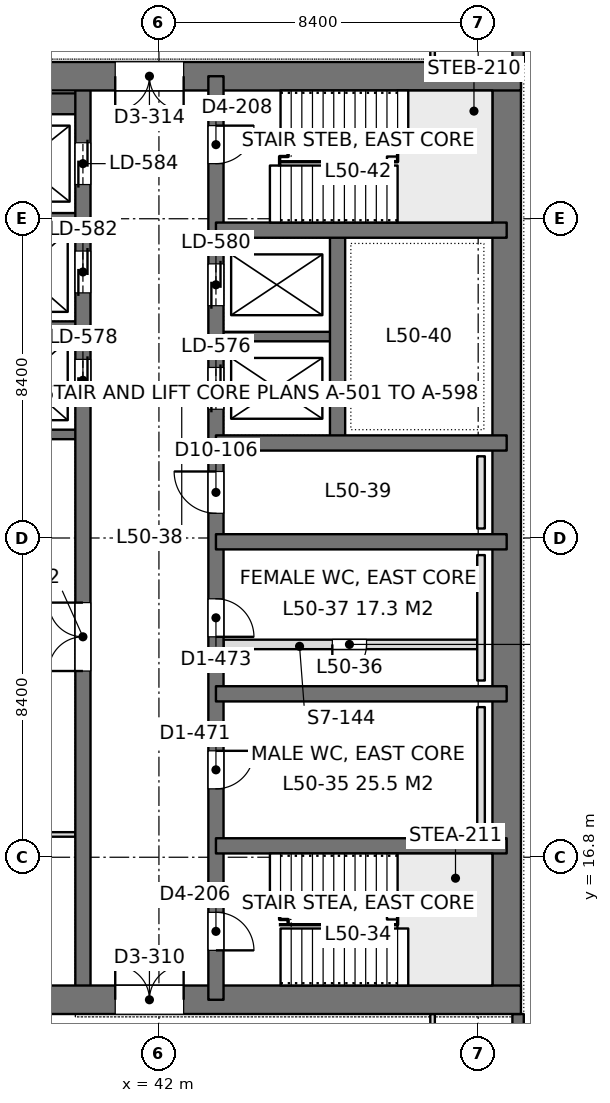
"""IFC4 building model, lengths in metres.
Left out: names, types, materials, properties, quantities, classifications, styles, units other than length and angle.
Written with IfcOpenShell. Run it as: python <this file> out.ifc"""

import sys

from ifc_helpers import new_model, si_unit, direction, frame, frame_2d, origin, place, context, subcontext, project, spatial, rectangle, extrude, element, fill, save


model = new_model("IFC4")
c1 = context("Model", 3, precision=1e-05, world=origin(), true_north=direction((0.0, 1.0)))
c2 = subcontext(c1, "Body", "Model", "MODEL_VIEW")
j1 = project(units=[si_unit("LENGTHUNIT", "METRE"), si_unit("PLANEANGLEUNIT", "RADIAN")], contexts=[c1])
p1 = place(None, origin())
s1 = spatial("IfcSite", under=j1, at=p1, CompositionType="ELEMENT")
p2 = place(p1, origin())
s2 = spatial("IfcBuilding", under=s1, at=p2, CompositionType="ELEMENT")
p3 = place(p2, frame((0.0, 0.0, 219.6)))
s3 = spatial("IfcBuildingStorey", under=s2, at=p3, CompositionType="ELEMENT", Elevation=219.6)
p4 = place(p3, frame((33.675, 13.05, 0.0), z_axis=(0.0, 0.0, 1.0), x_axis=(1.0, 0.0, 0.0)))
e1 = element("IfcWall", 1, at=p4, inside=s3, PredefinedType="SHEAR", context=c2, shape_type="SweptSolid", body=[
    extrude(rectangle(XDim=17.85, YDim=0.75, at=frame_2d((8.925, 0.0))), origin(), (0.0, 0.0, 1.0), 4.2),
])
p5 = place(p4, frame((7.175, 0.0, 0.0)))
e2 = element("IfcOpeningElement", 2, at=p5, cuts=e1, PredefinedType="OPENING", context=c2, shape_type="SweptSolid", body=[
    extrude(rectangle(XDim=1.8, YDim=2.4, at=frame_2d((0.9, 1.2))), frame((0.0, 0.385, 0.0), z_axis=(0.0, -1.0, 0.0), x_axis=(1.0, 0.0, 0.0)), (0.0, 0.0, 1.0), 0.77),
])
p6 = place(p3, frame((33.675, 37.35, 0.0), z_axis=(0.0, 0.0, 1.0), x_axis=(1.0, 0.0, 0.0)))
e3 = element("IfcWall", 3, at=p6, inside=s3, PredefinedType="SHEAR", context=c2, shape_type="SweptSolid", body=[
    extrude(rectangle(XDim=17.85, YDim=0.75, at=frame_2d((8.925, 0.0))), origin(), (0.0, 0.0, 1.0), 4.2),
])
p7 = place(p6, frame((7.175, 0.0, 0.0)))
e4 = element("IfcOpeningElement", 4, at=p7, cuts=e3, PredefinedType="OPENING", context=c2, shape_type="SweptSolid", body=[
    extrude(rectangle(XDim=1.8, YDim=2.4, at=frame_2d((0.9, 1.2))), frame((0.0, 0.385, 0.0), z_axis=(0.0, -1.0, 0.0), x_axis=(1.0, 0.0, 0.0)), (0.0, 0.0, 1.0), 0.77),
])
p8 = place(p3, frame((51.15, 13.05, 0.0), z_axis=(0.0, 0.0, 1.0), x_axis=(0.0, 1.0, 0.0)))
e5 = element("IfcWall", 5, at=p8, inside=s3, PredefinedType="SHEAR", context=c2, shape_type="SweptSolid", body=[
    extrude(rectangle(XDim=24.3, YDim=0.75, at=frame_2d((12.15, 0.0))), origin(), (0.0, 0.0, 1.0), 4.2),
])
p9 = place(p3, frame((43.5, 13.05, 0.0), z_axis=(0.0, 0.0, 1.0), x_axis=(0.0, 1.0, 0.0)))
e6 = element("IfcWall", 6, at=p9, inside=s3, PredefinedType="SHEAR", context=c2, shape_type="SweptSolid", body=[
    extrude(rectangle(XDim=24.3, YDim=0.4, at=frame_2d((12.15, 0.0))), origin(), (0.0, 0.0, 1.0), 4.2),
])
p10 = place(p9, frame((1.3, 0.0, 0.0)))
e7 = element("IfcOpeningElement", 7, at=p10, cuts=e6, PredefinedType="OPENING", context=c2, shape_type="SweptSolid", body=[
    extrude(rectangle(XDim=1.0, YDim=2.2, at=frame_2d((0.5, 1.1))), frame((0.0, 0.21, 0.0), z_axis=(0.0, -1.0, 0.0), x_axis=(1.0, 0.0, 0.0)), (0.0, 0.0, 1.0), 0.42),
])
p11 = place(p9, frame((22.0, 0.0, 0.0)))
e8 = element("IfcOpeningElement", 8, at=p11, cuts=e6, PredefinedType="OPENING", context=c2, shape_type="SweptSolid", body=[
    extrude(rectangle(XDim=1.0, YDim=2.2, at=frame_2d((0.5, 1.1))), frame((0.0, 0.21, 0.0), z_axis=(0.0, -1.0, 0.0), x_axis=(1.0, 0.0, 0.0)), (0.0, 0.0, 1.0), 0.42),
])
p12 = place(p9, frame((5.55, 0.0, 0.0)))
e9 = element("IfcOpeningElement", 9, at=p12, cuts=e6, PredefinedType="OPENING", context=c2, shape_type="SweptSolid", body=[
    extrude(rectangle(XDim=1.0, YDim=2.2, at=frame_2d((0.5, 1.1))), frame((0.0, 0.21, 0.0), z_axis=(0.0, -1.0, 0.0), x_axis=(1.0, 0.0, 0.0)), (0.0, 0.0, 1.0), 0.42),
])
p13 = place(p9, frame((9.55, 0.0, 0.0)))
e10 = element("IfcOpeningElement", 10, at=p13, cuts=e6, PredefinedType="OPENING", context=c2, shape_type="SweptSolid", body=[
    extrude(rectangle(XDim=1.0, YDim=2.2, at=frame_2d((0.5, 1.1))), frame((0.0, 0.21, 0.0), z_axis=(0.0, -1.0, 0.0), x_axis=(1.0, 0.0, 0.0)), (0.0, 0.0, 1.0), 0.42),
])
p14 = place(p9, frame((12.8, 0.0, 0.0)))
e11 = element("IfcOpeningElement", 11, at=p14, cuts=e6, PredefinedType="OPENING", context=c2, shape_type="SweptSolid", body=[
    extrude(rectangle(XDim=1.1, YDim=2.2, at=frame_2d((0.55, 1.1))), frame((0.0, 0.21, 0.0), z_axis=(0.0, -1.0, 0.0), x_axis=(1.0, 0.0, 0.0)), (0.0, 0.0, 1.0), 0.42),
])
p15 = place(p9, frame((15.538, 0.0, 0.0)))
e12 = element("IfcOpeningElement", 12, at=p15, cuts=e6, PredefinedType="OPENING", context=c2, shape_type="SweptSolid", body=[
    extrude(rectangle(XDim=1.1, YDim=2.2, at=frame_2d((0.55, 1.1))), frame((0.0, 0.21, 0.0), z_axis=(0.0, -1.0, 0.0), x_axis=(1.0, 0.0, 0.0)), (0.0, 0.0, 1.0), 0.42),
])
p16 = place(p9, frame((18.262, 0.0, 0.0)))
e13 = element("IfcOpeningElement", 13, at=p16, cuts=e6, PredefinedType="OPENING", context=c2, shape_type="SweptSolid", body=[
    extrude(rectangle(XDim=1.1, YDim=2.2, at=frame_2d((0.55, 1.1))), frame((0.0, 0.21, 0.0), z_axis=(0.0, -1.0, 0.0), x_axis=(1.0, 0.0, 0.0)), (0.0, 0.0, 1.0), 0.42),
])
p17 = place(p3, frame((40.0, 13.05, 0.0), z_axis=(0.0, 0.0, 1.0), x_axis=(0.0, 1.0, 0.0)))
e14 = element("IfcWall", 14, at=p17, inside=s3, PredefinedType="SHEAR", context=c2, shape_type="SweptSolid", body=[
    extrude(rectangle(XDim=24.3, YDim=0.4, at=frame_2d((12.15, 0.0))), origin(), (0.0, 0.0, 1.0), 4.2),
])
p18 = place(p17, frame((15.75, 0.0, 0.0)))
e15 = element("IfcOpeningElement", 15, at=p18, cuts=e14, PredefinedType="OPENING", context=c2, shape_type="SweptSolid", body=[
    extrude(rectangle(XDim=1.1, YDim=2.2, at=frame_2d((0.55, 1.1))), frame((0.0, 0.21, 0.0), z_axis=(0.0, -1.0, 0.0), x_axis=(1.0, 0.0, 0.0)), (0.0, 0.0, 1.0), 0.42),
])
p19 = place(p17, frame((18.6, 0.0, 0.0)))
e16 = element("IfcOpeningElement", 16, at=p19, cuts=e14, PredefinedType="OPENING", context=c2, shape_type="SweptSolid", body=[
    extrude(rectangle(XDim=1.1, YDim=2.2, at=frame_2d((0.55, 1.1))), frame((0.0, 0.21, 0.0), z_axis=(0.0, -1.0, 0.0), x_axis=(1.0, 0.0, 0.0)), (0.0, 0.0, 1.0), 0.42),
])
p20 = place(p17, frame((21.45, 0.0, 0.0)))
e17 = element("IfcOpeningElement", 17, at=p20, cuts=e14, PredefinedType="OPENING", context=c2, shape_type="SweptSolid", body=[
    extrude(rectangle(XDim=1.1, YDim=2.2, at=frame_2d((0.55, 1.1))), frame((0.0, 0.21, 0.0), z_axis=(0.0, -1.0, 0.0), x_axis=(1.0, 0.0, 0.0)), (0.0, 0.0, 1.0), 0.42),
])
p21 = place(p17, frame((8.65, 0.0, 0.0)))
e18 = element("IfcOpeningElement", 18, at=p21, cuts=e14, PredefinedType="OPENING", context=c2, shape_type="SweptSolid", body=[
    extrude(rectangle(XDim=1.8, YDim=2.4, at=frame_2d((0.9, 1.2))), frame((0.0, 0.21, 0.0), z_axis=(0.0, -1.0, 0.0), x_axis=(1.0, 0.0, 0.0)), (0.0, 0.0, 1.0), 0.42),
])
for number, where, z_axis, x_axis in (
    (19, (51.15, 17.1, 0.0), (0.0, 0.0, 1.0), (-1.0, 0.0, 0.0)),
    (20, (51.15, 21.1, 0.0), (0.0, 0.0, 1.0), (-1.0, 0.0, 0.0)),
    (21, (51.15, 25.1, 0.0), (0.0, 0.0, 1.0), (-1.0, 0.0, 0.0)),
    (22, (51.15, 27.7, 0.0), (0.0, 0.0, 1.0), (-1.0, 0.0, 0.0)),
    (23, (51.15, 33.3, 0.0), (0.0, 0.0, 1.0), (-1.0, 0.0, 0.0)),
):
    element("IfcWall", number, at=place(p3, frame(where, z_axis=z_axis, x_axis=x_axis)), inside=s3, PredefinedType="SHEAR", context=c2, shape_type="SweptSolid", body=[
        extrude(rectangle(XDim=7.65, YDim=0.4, at=frame_2d((3.825, 0.0))), origin(), (0.0, 0.0, 1.0), 4.2),
    ])
p22 = place(p3, frame((46.7, 27.7, 0.0), z_axis=(0.0, 0.0, 1.0), x_axis=(0.0, 1.0, 0.0)))
e24 = element("IfcWall", 24, at=p22, inside=s3, PredefinedType="SHEAR", context=c2, shape_type="SweptSolid", body=[
    extrude(rectangle(XDim=5.6, YDim=0.4, at=frame_2d((2.8, 0.0))), origin(), (0.0, 0.0, 1.0), 4.2),
])
p23 = place(p3, frame((46.7, 30.5, 0.0), z_axis=(0.0, 0.0, 1.0), x_axis=(-1.0, 0.0, 0.0)))
e25 = element("IfcWall", 25, at=p23, inside=s3, PredefinedType="SHEAR", context=c2, shape_type="SweptSolid", body=[
    extrude(rectangle(XDim=3.2, YDim=0.25, at=frame_2d((1.6, 0.0))), origin(), (0.0, 0.0, 1.0), 4.2),
])
p24 = place(p3, frame((40.0, 27.925, 0.0), z_axis=(0.0, 0.0, 1.0), x_axis=(-1.0, 0.0, 0.0)))
e26 = element("IfcWall", 26, at=p24, inside=s3, PredefinedType="SHEAR", context=c2, shape_type="SweptSolid", body=[
    extrude(rectangle(XDim=5.95, YDim=0.25, at=frame_2d((2.975, 0.0))), origin(), (0.0, 0.0, 1.0), 4.2),
])
for number, where, z_axis, x_axis in (
    (27, (40.0, 30.775, 0.0), (0.0, 0.0, 1.0), (-1.0, 0.0, 0.0)),
    (28, (40.0, 33.625, 0.0), (0.0, 0.0, 1.0), (-1.0, 0.0, 0.0)),
):
    element("IfcWall", number, at=place(p3, frame(where, z_axis=z_axis, x_axis=x_axis)), inside=s3, PredefinedType="SHEAR", context=c2, shape_type="SweptSolid", body=[
        extrude(rectangle(XDim=3.2, YDim=0.25, at=frame_2d((1.6, 0.0))), origin(), (0.0, 0.0, 1.0), 4.2),
    ])
p25 = place(p3, frame((40.0, 36.625, 0.0), z_axis=(0.0, 0.0, 1.0), x_axis=(-1.0, 0.0, 0.0)))
e29 = element("IfcWall", 29, at=p25, inside=s3, PredefinedType="SHEAR", context=c2, shape_type="SweptSolid", body=[
    extrude(rectangle(XDim=3.2, YDim=0.55, at=frame_2d((1.6, 0.0))), origin(), (0.0, 0.0, 1.0), 4.2),
])
p26 = place(p3, frame((51.45, 42.0, 0.0), z_axis=(0.0, 0.0, 1.0), x_axis=(0.0, -1.0, 0.0)))
e30 = element("IfcWall", 30, at=p26, inside=s3, PredefinedType="SOLIDWALL", context=c2, shape_type="SweptSolid", body=[
    extrude(rectangle(XDim=4.275, YDim=0.3, at=frame_2d((2.137, 0.0))), origin(), (0.0, 0.0, 1.0), 4.05),
])
p27 = place(p26, frame((0.938, 0.0, 0.9)))
e31 = element("IfcOpeningElement", 31, at=p27, cuts=e30, PredefinedType="OPENING", context=c2, shape_type="SweptSolid", body=[
    extrude(rectangle(XDim=2.4, YDim=1.9, at=frame_2d((1.2, 0.95))), frame((0.0, 0.16, 0.0), z_axis=(0.0, -1.0, 0.0), x_axis=(1.0, 0.0, 0.0)), (0.0, 0.0, 1.0), 0.32),
])
p28 = place(p3, frame((51.45, 12.675, 0.0), z_axis=(0.0, 0.0, 1.0), x_axis=(0.0, -1.0, 0.0)))
e32 = element("IfcWall", 32, at=p28, inside=s3, PredefinedType="SOLIDWALL", context=c2, shape_type="SweptSolid", body=[
    extrude(rectangle(XDim=4.275, YDim=0.3, at=frame_2d((2.138, 0.0))), origin(), (0.0, 0.0, 1.0), 4.05),
])
p29 = place(p28, frame((0.938, 0.0, 0.9)))
e33 = element("IfcOpeningElement", 33, at=p29, cuts=e32, PredefinedType="OPENING", context=c2, shape_type="SweptSolid", body=[
    extrude(rectangle(XDim=2.4, YDim=1.9, at=frame_2d((1.2, 0.95))), frame((0.0, 0.16, 0.0), z_axis=(0.0, -1.0, 0.0), x_axis=(1.0, 0.0, 0.0)), (0.0, 0.0, 1.0), 0.32),
])
p30 = place(p3, frame((33.898, 17.4, 0.0), z_axis=(0.0, 0.0, 1.0), x_axis=(1.0, 0.0, 0.0)))
e34 = element("IfcWall", 34, at=p30, inside=s3, PredefinedType="PARTITIONING", context=c2, shape_type="SweptSolid", body=[
    extrude(rectangle(XDim=5.904, YDim=0.12, at=frame_2d((2.952, 0.0))), origin(), (0.0, 0.0, 1.0), 3.55),
])
for number, where, z_axis, x_axis in (
    (35, (49.2, 11.1, 0.0), (0.0, 0.0, 1.0), (0.0, 1.0, 0.0)),
    (36, (49.2, 37.724, 0.0), (0.0, 0.0, 1.0), (0.0, 1.0, 0.0)),
):
    element("IfcWall", number, at=place(p3, frame(where, z_axis=z_axis, x_axis=x_axis)), inside=s3, PredefinedType="PARTITIONING", context=c2, shape_type="SweptSolid", body=[
        extrude(rectangle(XDim=1.576, YDim=0.12, at=frame_2d((0.788, 0.0))), origin(), (0.0, 0.0, 1.0), 4.05),
    ])
p31 = place(p3, frame((43.7, 22.4, 0.0), z_axis=(0.0, 0.0, 1.0), x_axis=(1.0, 0.0, 0.0)))
e37 = element("IfcWall", 37, at=p31, inside=s3, PredefinedType="PARTITIONING", context=c2, shape_type="SweptSolid", body=[
    extrude(rectangle(XDim=6.675, YDim=0.25, at=frame_2d((3.337, 0.0))), origin(), (0.0, 0.0, 1.0), 4.0),
])
p32 = place(p31, frame((2.863, 0.0, 0.0)))
e38 = element("IfcOpeningElement", 38, at=p32, cuts=e37, PredefinedType="OPENING", context=c2, shape_type="SweptSolid", body=[
    extrude(rectangle(XDim=0.9, YDim=2.2, at=frame_2d((0.45, 1.1))), frame((0.0, 0.135, 0.0), z_axis=(0.0, -1.0, 0.0), x_axis=(1.0, 0.0, 0.0)), (0.0, 0.0, 1.0), 0.27),
])
for number, where, z_axis, x_axis in (
    (39, (50.475, 17.45, 0.0), (0.0, 0.0, 1.0), (0.0, 1.0, 0.0)),
    (40, (50.475, 21.45, 0.0), (0.0, 0.0, 1.0), (0.0, 1.0, 0.0)),
):
    element("IfcWall", number, at=place(p3, frame(where, z_axis=z_axis, x_axis=x_axis)), inside=s3, PredefinedType="PLUMBINGWALL", context=c2, shape_type="SweptSolid", body=[
        extrude(rectangle(XDim=3.3, YDim=0.2, at=frame_2d((1.65, 0.0))), origin(), (0.0, 0.0, 1.0), 1.2),
    ])
p33 = place(p3, frame((50.475, 25.45, 0.0), z_axis=(0.0, 0.0, 1.0), x_axis=(0.0, 1.0, 0.0)))
e41 = element("IfcWall", 41, at=p33, inside=s3, PredefinedType="PLUMBINGWALL", context=c2, shape_type="SweptSolid", body=[
    extrude(rectangle(XDim=1.9, YDim=0.2, at=frame_2d((0.95, 0.0))), origin(), (0.0, 0.0, 1.0), 1.2),
])
p34 = place(p5, origin())
e42 = element("IfcDoor", 42, at=p34, inside=s3, OperationType="DOUBLE_DOOR_SINGLE_SWING", PredefinedType="DOOR", context=c2, shape_type="SweptSolid", body=[
    extrude(rectangle(XDim=1.8, YDim=2.4, at=frame_2d((0.9, 1.2))), frame((0.0, 0.025, 0.0), z_axis=(0.0, -1.0, 0.0), x_axis=(1.0, 0.0, 0.0)), (0.0, 0.0, 1.0), 0.05),
])
fill(e2, e42)
p35 = place(p7, frame((1.8, 0.0, 0.0), z_axis=(0.0, 0.0, 1.0), x_axis=(-1.0, 0.0, 0.0)))
e43 = element("IfcDoor", 43, at=p35, inside=s3, OperationType="DOUBLE_DOOR_SINGLE_SWING", PredefinedType="DOOR", context=c2, shape_type="SweptSolid", body=[
    extrude(rectangle(XDim=1.8, YDim=2.4, at=frame_2d((0.9, 1.2))), frame((0.0, 0.025, 0.0), z_axis=(0.0, -1.0, 0.0), x_axis=(1.0, 0.0, 0.0)), (0.0, 0.0, 1.0), 0.05),
])
fill(e4, e43)
p36 = place(p10, frame((1.0, 0.0, 0.0), z_axis=(0.0, 0.0, 1.0), x_axis=(-1.0, 0.0, 0.0)))
e44 = element("IfcDoor", 44, at=p36, inside=s3, OperationType="SINGLE_SWING_RIGHT", PredefinedType="DOOR", context=c2, shape_type="SweptSolid", body=[
    extrude(rectangle(XDim=1.0, YDim=2.2, at=frame_2d((0.5, 1.1))), frame((0.0, 0.025, 0.0), z_axis=(0.0, -1.0, 0.0), x_axis=(1.0, 0.0, 0.0)), (0.0, 0.0, 1.0), 0.05),
])
fill(e7, e44)
p37 = place(p11, frame((1.0, 0.0, 0.0), z_axis=(0.0, 0.0, 1.0), x_axis=(-1.0, 0.0, 0.0)))
e45 = element("IfcDoor", 45, at=p37, inside=s3, OperationType="SINGLE_SWING_LEFT", PredefinedType="DOOR", context=c2, shape_type="SweptSolid", body=[
    extrude(rectangle(XDim=1.0, YDim=2.2, at=frame_2d((0.5, 1.1))), frame((0.0, 0.025, 0.0), z_axis=(0.0, -1.0, 0.0), x_axis=(1.0, 0.0, 0.0)), (0.0, 0.0, 1.0), 0.05),
])
fill(e8, e45)
p38 = place(p12, frame((1.0, 0.0, 0.0), z_axis=(0.0, 0.0, 1.0), x_axis=(-1.0, 0.0, 0.0)))
e46 = element("IfcDoor", 46, at=p38, inside=s3, OperationType="SINGLE_SWING_LEFT", PredefinedType="DOOR", context=c2, shape_type="SweptSolid", body=[
    extrude(rectangle(XDim=1.0, YDim=2.2, at=frame_2d((0.5, 1.1))), frame((0.0, 0.025, 0.0), z_axis=(0.0, -1.0, 0.0), x_axis=(1.0, 0.0, 0.0)), (0.0, 0.0, 1.0), 0.05),
])
fill(e9, e46)
p39 = place(p13, frame((1.0, 0.0, 0.0), z_axis=(0.0, 0.0, 1.0), x_axis=(-1.0, 0.0, 0.0)))
e47 = element("IfcDoor", 47, at=p39, inside=s3, OperationType="SINGLE_SWING_RIGHT", PredefinedType="DOOR", context=c2, shape_type="SweptSolid", body=[
    extrude(rectangle(XDim=1.0, YDim=2.2, at=frame_2d((0.5, 1.1))), frame((0.0, 0.025, 0.0), z_axis=(0.0, -1.0, 0.0), x_axis=(1.0, 0.0, 0.0)), (0.0, 0.0, 1.0), 0.05),
])
fill(e10, e47)
p40 = place(p14, origin())
e48 = element("IfcDoor", 48, at=p40, inside=s3, OperationType="SINGLE_SWING_RIGHT", PredefinedType="DOOR", context=c2, shape_type="SweptSolid", body=[
    extrude(rectangle(XDim=1.1, YDim=2.2, at=frame_2d((0.55, 1.1))), frame((0.0, 0.025, 0.0), z_axis=(0.0, -1.0, 0.0), x_axis=(1.0, 0.0, 0.0)), (0.0, 0.0, 1.0), 0.05),
])
fill(e11, e48)
p41 = place(p18, origin())
e49 = element("IfcDoor", 49, at=p41, inside=s3, OperationType="DOUBLE_DOOR_SLIDING", PredefinedType="DOOR", context=c2, shape_type="SweptSolid", body=[
    extrude(rectangle(XDim=1.1, YDim=2.2, at=frame_2d((0.55, 1.1))), frame((0.0, 0.025, 0.0), z_axis=(0.0, -1.0, 0.0), x_axis=(1.0, 0.0, 0.0)), (0.0, 0.0, 1.0), 0.05),
])
fill(e15, e49)
p42 = place(p19, origin())
e50 = element("IfcDoor", 50, at=p42, inside=s3, OperationType="DOUBLE_DOOR_SLIDING", PredefinedType="DOOR", context=c2, shape_type="SweptSolid", body=[
    extrude(rectangle(XDim=1.1, YDim=2.2, at=frame_2d((0.55, 1.1))), frame((0.0, 0.025, 0.0), z_axis=(0.0, -1.0, 0.0), x_axis=(1.0, 0.0, 0.0)), (0.0, 0.0, 1.0), 0.05),
])
fill(e16, e50)
p43 = place(p20, origin())
e51 = element("IfcDoor", 51, at=p43, inside=s3, OperationType="DOUBLE_DOOR_SLIDING", PredefinedType="DOOR", context=c2, shape_type="SweptSolid", body=[
    extrude(rectangle(XDim=1.1, YDim=2.2, at=frame_2d((0.55, 1.1))), frame((0.0, 0.025, 0.0), z_axis=(0.0, -1.0, 0.0), x_axis=(1.0, 0.0, 0.0)), (0.0, 0.0, 1.0), 0.05),
])
fill(e17, e51)
p44 = place(p15, origin())
e52 = element("IfcDoor", 52, at=p44, inside=s3, OperationType="DOUBLE_DOOR_SLIDING", PredefinedType="DOOR", context=c2, shape_type="SweptSolid", body=[
    extrude(rectangle(XDim=1.1, YDim=2.2, at=frame_2d((0.55, 1.1))), frame((0.0, 0.025, 0.0), z_axis=(0.0, -1.0, 0.0), x_axis=(1.0, 0.0, 0.0)), (0.0, 0.0, 1.0), 0.05),
])
fill(e12, e52)
p45 = place(p16, origin())
e53 = element("IfcDoor", 53, at=p45, inside=s3, OperationType="DOUBLE_DOOR_SLIDING", PredefinedType="DOOR", context=c2, shape_type="SweptSolid", body=[
    extrude(rectangle(XDim=1.1, YDim=2.2, at=frame_2d((0.55, 1.1))), frame((0.0, 0.025, 0.0), z_axis=(0.0, -1.0, 0.0), x_axis=(1.0, 0.0, 0.0)), (0.0, 0.0, 1.0), 0.05),
])
fill(e13, e53)
p46 = place(p21, origin())
e54 = element("IfcDoor", 54, at=p46, inside=s3, OperationType="DOUBLE_DOOR_SINGLE_SWING", PredefinedType="DOOR", context=c2, shape_type="SweptSolid", body=[
    extrude(rectangle(XDim=1.8, YDim=2.4, at=frame_2d((0.9, 1.2))), frame((0.0, 0.025, 0.0), z_axis=(0.0, -1.0, 0.0), x_axis=(1.0, 0.0, 0.0)), (0.0, 0.0, 1.0), 0.05),
])
fill(e18, e54)
p47 = place(p32, frame((0.9, 0.0, 0.0), z_axis=(0.0, 0.0, 1.0), x_axis=(-1.0, 0.0, 0.0)))
e55 = element("IfcDoor", 55, at=p47, inside=s3, OperationType="SINGLE_SWING_RIGHT", PredefinedType="DOOR", context=c2, shape_type="SweptSolid", body=[
    extrude(rectangle(XDim=0.9, YDim=2.2, at=frame_2d((0.45, 1.1))), frame((0.0, 0.025, 0.0), z_axis=(0.0, -1.0, 0.0), x_axis=(1.0, 0.0, 0.0)), (0.0, 0.0, 1.0), 0.05),
])
fill(e38, e55)
save(model, sys.argv[1])
